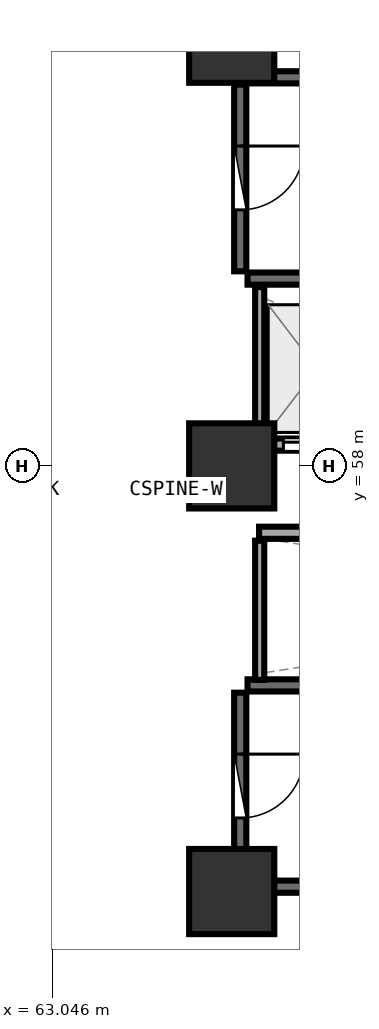
"""IFC4 building model, lengths in metres.
Left out: names, types, materials, properties, quantities, classifications, styles, units other than length and angle.
Written with IfcOpenShell. Run it as: python <this file> out.ifc"""

import sys

from ifc_helpers import new_model, si_unit, direction, frame, frame_2d, origin, origin_2d, place, context, subcontext, project, spatial, rectangle, extrude, element, fill, save


model = new_model("IFC4")
c1 = context("Model", 3, precision=1e-05, world=origin(), true_north=direction((0.0, 1.0)))
c2 = subcontext(c1, "Body", "Model", "MODEL_VIEW")
j1 = project(units=[si_unit("LENGTHUNIT", "METRE"), si_unit("PLANEANGLEUNIT", "RADIAN")], contexts=[c1])
p1 = place(None, origin())
s1 = spatial("IfcSite", under=j1, at=p1, CompositionType="ELEMENT")
p2 = place(p1, origin())
s2 = spatial("IfcBuilding", under=s1, at=p2, CompositionType="ELEMENT")
p3 = place(p2, frame((0.0, 0.0, 30.0)))
s3 = spatial("IfcBuildingStorey", under=s2, at=p3, CompositionType="ELEMENT", Elevation=30.0)
for number, where, z_axis, x_axis in (
    (1, (66.0, 51.0, 0.0), (0.0, 0.0, 1.0), (1.0, 0.0, 0.0)),
    (2, (66.0, 65.0, 0.0), (0.0, 0.0, 1.0), (1.0, 0.0, 0.0)),
    (3, (66.0, 58.0, 0.0), (0.0, 0.0, 1.0), (1.0, 0.0, 0.0)),
):
    element("IfcColumn", number, at=place(p3, frame(where, z_axis=z_axis, x_axis=x_axis)), inside=s3, PredefinedType="PILASTER", context=c2, shape_type="SweptSolid", body=[
        extrude(rectangle(XDim=1.4, YDim=1.4, at=origin_2d()), origin(), (0.0, 0.0, 1.0), 3.75),
    ])
for number, where, z_axis, x_axis in (
    (4, (66.26, 61.08, 0.0), (0.0, 0.0, 1.0), (1.0, 0.0, 0.0)),
    (5, (73.42, 64.39, 0.0), (0.0, 0.0, 1.0), (-1.0, 0.0, 0.0)),
):
    element("IfcWall", number, at=place(p3, frame(where, z_axis=z_axis, x_axis=x_axis)), inside=s3, PredefinedType="SHEAR", context=c2, shape_type="SweptSolid", body=[
        extrude(rectangle(XDim=7.16, YDim=0.2, at=frame_2d((3.58, 0.0))), origin(), (0.0, 0.0, 1.0), 3.49),
    ])
p4 = place(p3, frame((66.14, 64.27, 0.0), z_axis=(0.0, 0.0, 1.0), x_axis=(0.0, -1.0, 0.0)))
e6 = element("IfcWall", 6, at=p4, inside=s3, PredefinedType="SHEAR", context=c2, shape_type="SweptSolid", body=[
    extrude(rectangle(XDim=3.07, YDim=0.2, at=frame_2d((1.535, 0.0))), origin(), (0.0, 0.0, 1.0), 3.49),
])
p5 = place(p4, frame((1.01, 0.0, 0.0)))
e7 = element("IfcOpeningElement", 7, at=p5, cuts=e6, PredefinedType="OPENING", context=c2, shape_type="SweptSolid", body=[
    extrude(rectangle(XDim=1.05, YDim=2.1, at=frame_2d((0.525, 1.05))), frame((0.0, 0.11, 0.0), z_axis=(0.0, -1.0, 0.0), x_axis=(1.0, 0.0, 0.0)), (0.0, 0.0, 1.0), 0.22),
])
for number, where, z_axis, x_axis in (
    (8, (66.26, 51.08, 0.0), (0.0, 0.0, 1.0), (1.0, 0.0, 0.0)),
    (9, (73.42, 54.39, 0.0), (0.0, 0.0, 1.0), (-1.0, 0.0, 0.0)),
):
    element("IfcWall", number, at=place(p3, frame(where, z_axis=z_axis, x_axis=x_axis)), inside=s3, PredefinedType="SHEAR", context=c2, shape_type="SweptSolid", body=[
        extrude(rectangle(XDim=7.16, YDim=0.2, at=frame_2d((3.58, 0.0))), origin(), (0.0, 0.0, 1.0), 3.49),
    ])
p6 = place(p3, frame((66.14, 54.27, 0.0), z_axis=(0.0, 0.0, 1.0), x_axis=(0.0, -1.0, 0.0)))
e10 = element("IfcWall", 10, at=p6, inside=s3, PredefinedType="SHEAR", context=c2, shape_type="SweptSolid", body=[
    extrude(rectangle(XDim=3.07, YDim=0.2, at=frame_2d((1.535, 0.0))), origin(), (0.0, 0.0, 1.0), 3.49),
])
p7 = place(p6, frame((1.01, 0.0, 0.0)))
e11 = element("IfcOpeningElement", 11, at=p7, cuts=e10, PredefinedType="OPENING", context=c2, shape_type="SweptSolid", body=[
    extrude(rectangle(XDim=1.05, YDim=2.1, at=frame_2d((0.525, 1.05))), frame((0.0, 0.11, 0.0), z_axis=(0.0, -1.0, 0.0), x_axis=(1.0, 0.0, 0.0)), (0.0, 0.0, 1.0), 0.22),
])
p8 = place(p3, frame((66.45, 58.35, 0.0), z_axis=(0.0, 0.0, 1.0), x_axis=(1.0, 0.0, 0.0)))
e12 = element("IfcWall", 12, at=p8, inside=s3, PredefinedType="SOLIDWALL", context=c2, shape_type="SweptSolid", body=[
    extrude(rectangle(XDim=6.0, YDim=0.2, at=frame_2d((3.0, 0.0))), origin(), (0.0, 0.0, 1.0), 3.48),
])
p9 = place(p8, frame((0.4, 0.0, 0.0)))
e13 = element("IfcOpeningElement", 13, at=p9, cuts=e12, PredefinedType="OPENING", context=c2, shape_type="SweptSolid", body=[
    extrude(rectangle(XDim=1.1, YDim=2.1, at=frame_2d((0.55, 1.05))), frame((0.0, 0.11, 0.0), z_axis=(0.0, -1.0, 0.0), x_axis=(1.0, 0.0, 0.0)), (0.0, 0.0, 1.0), 0.22),
])
p10 = place(p8, frame((2.4, 0.0, 0.0)))
e14 = element("IfcOpeningElement", 14, at=p10, cuts=e12, PredefinedType="OPENING", context=c2, shape_type="SweptSolid", body=[
    extrude(rectangle(XDim=1.1, YDim=2.1, at=frame_2d((0.55, 1.05))), frame((0.0, 0.11, 0.0), z_axis=(0.0, -1.0, 0.0), x_axis=(1.0, 0.0, 0.0)), (0.0, 0.0, 1.0), 0.22),
])
p11 = place(p8, frame((4.4, 0.0, 0.0)))
e15 = element("IfcOpeningElement", 15, at=p11, cuts=e12, PredefinedType="OPENING", context=c2, shape_type="SweptSolid", body=[
    extrude(rectangle(XDim=1.1, YDim=2.1, at=frame_2d((0.55, 1.05))), frame((0.0, 0.11, 0.0), z_axis=(0.0, -1.0, 0.0), x_axis=(1.0, 0.0, 0.0)), (0.0, 0.0, 1.0), 0.22),
])
p12 = place(p3, frame((66.46, 58.48, 0.0), z_axis=(0.0, 0.0, 1.0), x_axis=(0.0, 1.0, 0.0)))
e16 = element("IfcWall", 16, at=p12, inside=s3, PredefinedType="PARTITIONING", context=c2, shape_type="SweptSolid", body=[
    extrude(rectangle(XDim=2.46, YDim=0.15, at=frame_2d((1.23, 0.0))), origin(), (0.0, 0.0, 1.0), 3.48),
])
p13 = place(p3, frame((66.45, 56.9, 0.0), z_axis=(0.0, 0.0, 1.0), x_axis=(1.0, 0.0, 0.0)))
e17 = element("IfcWall", 17, at=p13, inside=s3, PredefinedType="SOLIDWALL", context=c2, shape_type="SweptSolid", body=[
    extrude(rectangle(XDim=14.4, YDim=0.2, at=frame_2d((7.2, 0.0))), origin(), (0.0, 0.0, 1.0), 3.48),
])
p14 = place(p3, frame((66.46, 54.48, 0.0), z_axis=(0.0, 0.0, 1.0), x_axis=(0.0, 1.0, 0.0)))
e18 = element("IfcWall", 18, at=p14, inside=s3, PredefinedType="PARTITIONING", context=c2, shape_type="SweptSolid", body=[
    extrude(rectangle(XDim=2.29, YDim=0.15, at=frame_2d((1.145, 0.0))), origin(), (0.0, 0.0, 1.0), 3.48),
])
p15 = place(p3, frame((64.446, 68.507, 0.0), z_axis=(0.0, 0.0, 1.0), x_axis=(-0.660323401664, -0.75098136143, 0.0)))
e19 = element("IfcWall", 19, at=p15, inside=s3, PredefinedType="PARTITIONING", context=c2, shape_type="SweptSolid", body=[
    extrude(rectangle(XDim=5.857, YDim=0.12, at=frame_2d((2.929, 0.0))), origin(), (0.0, 0.0, 1.0), 2.875),
])
p16 = place(p15, frame((2.479, 0.0, 0.0)))
e20 = element("IfcOpeningElement", 20, at=p16, cuts=e19, PredefinedType="OPENING", context=c2, shape_type="SweptSolid", body=[
    extrude(rectangle(XDim=0.9, YDim=2.08, at=frame_2d((0.45, 1.04))), frame((0.0, 0.07, 0.0), z_axis=(0.0, -1.0, 0.0), x_axis=(1.0, 0.0, 0.0)), (0.0, 0.0, 1.0), 0.14),
])
p17 = place(p5, origin())
e21 = element("IfcDoor", 21, at=p17, inside=s3, OperationType="SINGLE_SWING_LEFT", PredefinedType="DOOR", context=c2, shape_type="SweptSolid", body=[
    extrude(rectangle(XDim=1.05, YDim=2.1, at=frame_2d((0.525, 1.05))), frame((0.0, 0.025, 0.0), z_axis=(0.0, -1.0, 0.0), x_axis=(1.0, 0.0, 0.0)), (0.0, 0.0, 1.0), 0.05),
])
fill(e7, e21)
p18 = place(p7, origin())
e22 = element("IfcDoor", 22, at=p18, inside=s3, OperationType="SINGLE_SWING_LEFT", PredefinedType="DOOR", context=c2, shape_type="SweptSolid", body=[
    extrude(rectangle(XDim=1.05, YDim=2.1, at=frame_2d((0.525, 1.05))), frame((0.0, 0.025, 0.0), z_axis=(0.0, -1.0, 0.0), x_axis=(1.0, 0.0, 0.0)), (0.0, 0.0, 1.0), 0.05),
])
fill(e11, e22)
p19 = place(p9, origin())
e23 = element("IfcDoor", 23, at=p19, inside=s3, OperationType="DOUBLE_DOOR_SLIDING", PredefinedType="DOOR", context=c2, shape_type="SweptSolid", body=[
    extrude(rectangle(XDim=1.1, YDim=2.1, at=frame_2d((0.55, 1.05))), frame((0.0, 0.025, 0.0), z_axis=(0.0, -1.0, 0.0), x_axis=(1.0, 0.0, 0.0)), (0.0, 0.0, 1.0), 0.05),
])
fill(e13, e23)
save(model, sys.argv[1])
